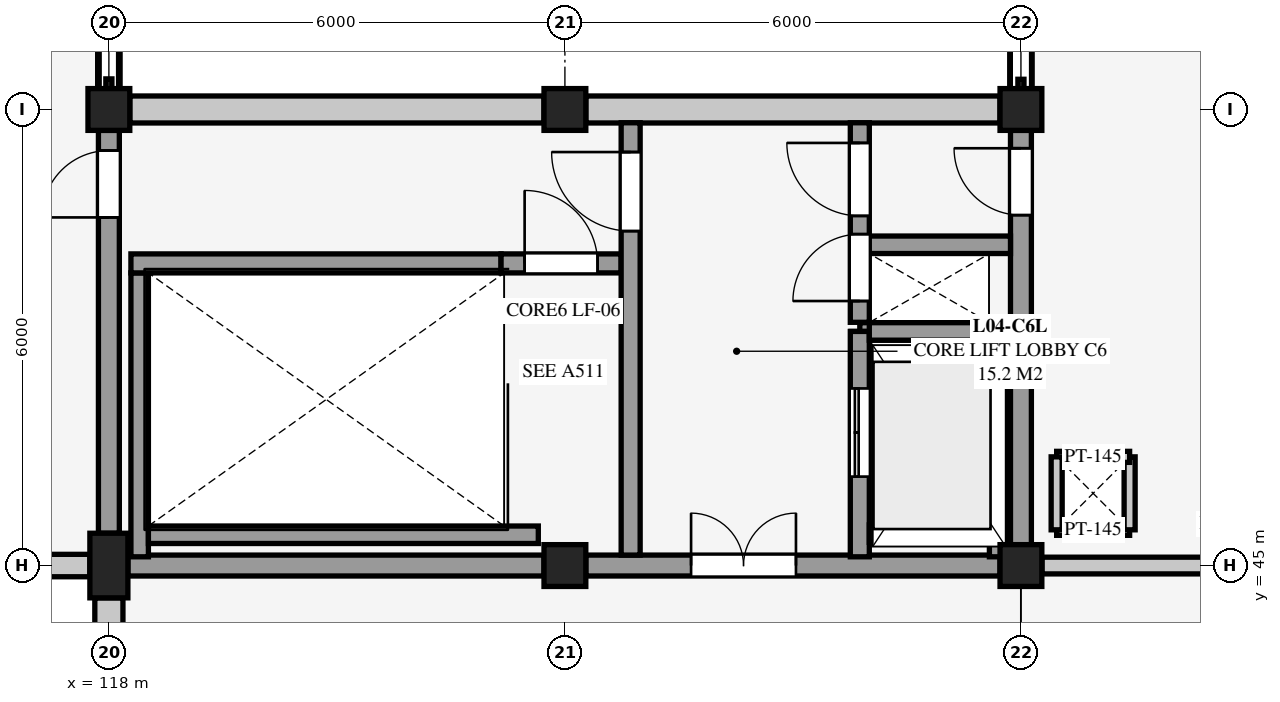
"""IFC4 building model, lengths in metres.
Left out: names, types, materials, properties, quantities, classifications, styles, units other than length and angle.
Written with IfcOpenShell. Run it as: python <this file> out.ifc"""

import sys

from ifc_helpers import new_model, si_unit, direction, frame, frame_2d, origin, origin_2d, place, context, subcontext, project, spatial, rectangle, extrude, element, fill, save


model = new_model("IFC4")
c1 = context("Model", 3, precision=1e-05, world=origin(), true_north=direction((0.0, 1.0)))
c2 = subcontext(c1, "Body", "Model", "MODEL_VIEW")
j1 = project(units=[si_unit("LENGTHUNIT", "METRE"), si_unit("PLANEANGLEUNIT", "RADIAN")], contexts=[c1])
p1 = place(None, origin())
s1 = spatial("IfcSite", under=j1, at=p1, CompositionType="ELEMENT")
p2 = place(p1, origin())
s2 = spatial("IfcBuilding", under=s1, at=p2, CompositionType="ELEMENT")
p3 = place(p2, frame((0.0, 0.0, 13.5)))
s3 = spatial("IfcBuildingStorey", under=s2, at=p3, CompositionType="ELEMENT", Elevation=13.5)
p4 = place(p3, frame((118.0, 45.0, 0.0), z_axis=(0.0, 0.0, 1.0), x_axis=(1.0, 0.0, 0.0)))
e1 = element("IfcColumn", 1, at=p4, inside=s3, PredefinedType="PILASTER", context=c2, shape_type="SweptSolid", body=[
    extrude(rectangle(XDim=0.5, YDim=0.85, at=origin_2d()), origin(), (0.0, 0.0, 1.0), 4.5),
])
for number, where, z_axis, x_axis in (
    (2, (118.0, 51.0, 0.0), (0.0, 0.0, 1.0), (1.0, 0.0, 0.0)),
    (3, (124.0, 45.0, 0.0), (0.0, 0.0, 1.0), (1.0, 0.0, 0.0)),
    (4, (124.0, 51.0, 0.0), (0.0, 0.0, 1.0), (1.0, 0.0, 0.0)),
    (5, (130.0, 45.0, 0.0), (0.0, 0.0, 1.0), (1.0, 0.0, 0.0)),
    (6, (130.0, 51.0, 0.0), (0.0, 0.0, 1.0), (1.0, 0.0, 0.0)),
):
    element("IfcColumn", number, at=place(p3, frame(where, z_axis=z_axis, x_axis=x_axis)), inside=s3, PredefinedType="COLUMN", context=c2, shape_type="SweptSolid", body=[
        extrude(rectangle(XDim=0.55, YDim=0.55, at=origin_2d()), origin(), (0.0, 0.0, 1.0), 4.5),
    ])
p5 = place(p3, frame((117.75, 45.0, 0.0), z_axis=(0.0, 0.0, 1.0), x_axis=(-1.0, 0.0, 0.0)))
e7 = element("IfcWall", 7, at=p5, inside=s3, PredefinedType="SOLIDWALL", context=c2, shape_type="SweptSolid", body=[
    extrude(rectangle(XDim=5.5, YDim=0.295, at=frame_2d((2.75, 0.0))), origin(), (0.0, 0.0, 1.0), 8.593),
])
p6 = place(p5, frame((1.95, 0.0, 1.25)))
e8 = element("IfcOpeningElement", 8, at=p6, cuts=e7, PredefinedType="OPENING", context=c2, shape_type="SweptSolid", body=[
    extrude(rectangle(XDim=1.6, YDim=1.5, at=frame_2d((0.8, 0.75))), frame((0.0, 0.157, 0.0), z_axis=(0.0, -1.0, 0.0), x_axis=(1.0, 0.0, 0.0)), (0.0, 0.0, 1.0), 0.315),
])
p7 = place(p3, frame((118.0, 56.075, 0.0), z_axis=(0.0, 0.0, 1.0), x_axis=(0.0, -1.0, 0.0)))
e9 = element("IfcWall", 9, at=p7, inside=s3, PredefinedType="SOLIDWALL", context=c2, shape_type="SweptSolid", body=[
    extrude(rectangle(XDim=4.8, YDim=0.295, at=frame_2d((2.4, 0.0))), origin(), (0.0, 0.0, 1.0), 0.26),
])
p8 = place(p3, frame((118.0, 39.275, 0.0), z_axis=(0.0, 0.0, 1.0), x_axis=(0.0, 1.0, 0.0)))
e10 = element("IfcWall", 10, at=p8, inside=s3, PredefinedType="SOLIDWALL", context=c2, shape_type="SweptSolid", body=[
    extrude(rectangle(XDim=5.3, YDim=0.37, at=frame_2d((2.65, 0.0))), origin(), (0.0, 0.0, 1.0), 4.093),
])
p9 = place(p8, frame((1.625, 0.0, 1.2)))
e11 = element("IfcOpeningElement", 11, at=p9, cuts=e10, PredefinedType="OPENING", context=c2, shape_type="SweptSolid", body=[
    extrude(rectangle(XDim=2.05, YDim=1.55, at=frame_2d((1.025, 0.775))), frame((0.0, 0.195, 0.0), z_axis=(0.0, -1.0, 0.0), x_axis=(1.0, 0.0, 0.0)), (0.0, 0.0, 1.0), 0.39),
])
for number, where, z_axis, x_axis in (
    (12, (118.275, 51.0, 0.0), (0.0, 0.0, 1.0), (1.0, 0.0, 0.0)),
    (13, (124.275, 51.0, 0.0), (0.0, 0.0, 1.0), (1.0, 0.0, 0.0)),
):
    element("IfcWall", number, at=place(p3, frame(where, z_axis=z_axis, x_axis=x_axis)), inside=s3, PredefinedType="SOLIDWALL", context=c2, shape_type="SweptSolid", body=[
        extrude(rectangle(XDim=5.45, YDim=0.355, at=frame_2d((2.725, 0.0))), origin(), (0.0, 0.0, 1.0), 4.093),
    ])
p10 = place(p3, frame((130.0, 51.275, 0.0), z_axis=(0.0, 0.0, 1.0), x_axis=(0.0, 1.0, 0.0)))
e14 = element("IfcWall", 14, at=p10, inside=s3, PredefinedType="SOLIDWALL", context=c2, shape_type="SweptSolid", body=[
    extrude(rectangle(XDim=4.95, YDim=0.295, at=frame_2d((2.475, 0.0))), origin(), (0.0, 0.0, 1.0), 0.46),
])
for number, where, z_axis, x_axis in (
    (15, (130.47, 45.47, 0.0), (0.0, 0.0, 1.0), (1.0, 0.0, 0.0)),
    (16, (131.43, 45.47, 0.0), (0.0, 0.0, 1.0), (0.0, 1.0, 0.0)),
    (17, (131.43, 46.43, 0.0), (0.0, 0.0, 1.0), (-1.0, 0.0, 0.0)),
    (18, (130.47, 46.43, 0.0), (0.0, 0.0, 1.0), (0.0, -1.0, 0.0)),
):
    element("IfcWall", number, at=place(p3, frame(where, z_axis=z_axis, x_axis=x_axis)), inside=s3, PredefinedType="PARTITIONING", context=c2, shape_type="SweptSolid", body=[
        extrude(rectangle(XDim=0.96, YDim=0.145, at=frame_2d((0.48, 0.0))), origin(), (0.0, 0.0, 1.0), 4.24),
    ])
p11 = place(p3, frame((127.88, 45.42, 4.5), z_axis=(0.0, 0.0, 1.0), x_axis=(1.0, 0.0, 0.0)))
e19 = element("IfcWall", 19, at=p11, inside=s3, PredefinedType="SHEAR", context=c2, shape_type="SweptSolid", body=[
    extrude(rectangle(XDim=1.82, YDim=0.23, at=frame_2d((0.91, 0.0))), origin(), (0.0, 0.0, 1.0), 1.0),
])
p12 = place(p3, frame((129.7, 45.42, 4.5), z_axis=(0.0, 0.0, 1.0), x_axis=(0.0, 1.0, 0.0)))
e20 = element("IfcWall", 20, at=p12, inside=s3, PredefinedType="SHEAR", context=c2, shape_type="SweptSolid", body=[
    extrude(rectangle(XDim=2.66, YDim=0.23, at=frame_2d((1.33, 0.0))), origin(), (0.0, 0.0, 1.0), 1.0),
])
p13 = place(p3, frame((129.7, 48.08, 4.5), z_axis=(0.0, 0.0, 1.0), x_axis=(-1.0, 0.0, 0.0)))
e21 = element("IfcWall", 21, at=p13, inside=s3, PredefinedType="SHEAR", context=c2, shape_type="SweptSolid", body=[
    extrude(rectangle(XDim=1.82, YDim=0.23, at=frame_2d((0.91, 0.0))), origin(), (0.0, 0.0, 1.0), 1.0),
])
p14 = place(p3, frame((127.88, 48.08, 4.5), z_axis=(0.0, 0.0, 1.0), x_axis=(0.0, -1.0, 0.0)))
e22 = element("IfcWall", 22, at=p14, inside=s3, PredefinedType="SHEAR", context=c2, shape_type="SweptSolid", body=[
    extrude(rectangle(XDim=2.66, YDim=0.23, at=frame_2d((1.33, 0.0))), origin(), (0.0, 0.0, 1.0), 1.0),
])
p15 = place(p3, frame((118.25, 45.0, 0.0), z_axis=(0.0, 0.0, 1.0), x_axis=(1.0, 0.0, 0.0)))
e23 = element("IfcWall", 23, at=p15, inside=s3, PredefinedType="SHEAR", context=c2, shape_type="SweptSolid", body=[
    extrude(rectangle(XDim=5.475, YDim=0.275, at=frame_2d((2.738, 0.0))), origin(), (0.0, 0.0, 1.0), 4.24),
])
p16 = place(p3, frame((124.275, 45.0, 0.0), z_axis=(0.0, 0.0, 1.0), x_axis=(1.0, 0.0, 0.0)))
e24 = element("IfcWall", 24, at=p16, inside=s3, PredefinedType="SHEAR", context=c2, shape_type="SweptSolid", body=[
    extrude(rectangle(XDim=5.45, YDim=0.275, at=frame_2d((2.725, 0.0))), origin(), (0.0, 0.0, 1.0), 4.24),
])
p17 = place(p16, frame((1.385, 0.0, 0.0)))
e25 = element("IfcOpeningElement", 25, at=p17, cuts=e24, PredefinedType="OPENING", context=c2, shape_type="SweptSolid", body=[
    extrude(rectangle(XDim=1.38, YDim=2.16, at=frame_2d((0.69, 1.08))), frame((0.0, 0.147, 0.0), z_axis=(0.0, -1.0, 0.0), x_axis=(1.0, 0.0, 0.0)), (0.0, 0.0, 1.0), 0.295),
])
p18 = place(p3, frame((118.0, 45.425, 0.0), z_axis=(0.0, 0.0, 1.0), x_axis=(0.0, 1.0, 0.0)))
e26 = element("IfcWall", 26, at=p18, inside=s3, PredefinedType="SHEAR", context=c2, shape_type="SweptSolid", body=[
    extrude(rectangle(XDim=5.3, YDim=0.275, at=frame_2d((2.65, 0.0))), origin(), (0.0, 0.0, 1.0), 4.24),
])
p19 = place(p18, frame((4.155, 0.0, 0.0)))
e27 = element("IfcOpeningElement", 27, at=p19, cuts=e26, PredefinedType="OPENING", context=c2, shape_type="SweptSolid", body=[
    extrude(rectangle(XDim=0.88, YDim=2.08, at=frame_2d((0.44, 1.04))), frame((0.0, 0.147, 0.0), z_axis=(0.0, -1.0, 0.0), x_axis=(1.0, 0.0, 0.0)), (0.0, 0.0, 1.0), 0.295),
])
p20 = place(p3, frame((130.0, 45.275, 0.0), z_axis=(0.0, 0.0, 1.0), x_axis=(0.0, 1.0, 0.0)))
e28 = element("IfcWall", 28, at=p20, inside=s3, PredefinedType="SHEAR", context=c2, shape_type="SweptSolid", body=[
    extrude(rectangle(XDim=5.45, YDim=0.275, at=frame_2d((2.725, 0.0))), origin(), (0.0, 0.0, 1.0), 4.24),
])
p21 = place(p20, frame((4.335, 0.0, 0.0)))
e29 = element("IfcOpeningElement", 29, at=p21, cuts=e28, PredefinedType="OPENING", context=c2, shape_type="SweptSolid", body=[
    extrude(rectangle(XDim=0.88, YDim=2.08, at=frame_2d((0.44, 1.04))), frame((0.0, 0.147, 0.0), z_axis=(0.0, -1.0, 0.0), x_axis=(1.0, 0.0, 0.0)), (0.0, 0.0, 1.0), 0.295),
])
p22 = place(p3, frame((118.405, 45.115, 0.0), z_axis=(0.0, 0.0, 1.0), x_axis=(0.0, 1.0, 0.0)))
e30 = element("IfcWall", 30, at=p22, inside=s3, PredefinedType="SHEAR", context=c2, shape_type="SweptSolid", body=[
    extrude(rectangle(XDim=3.735, YDim=0.23, at=frame_2d((1.868, 0.0))), origin(), (0.0, 0.0, 1.0), 4.5),
])
p23 = place(p3, frame((118.52, 45.405, 0.0), z_axis=(0.0, 0.0, 1.0), x_axis=(1.0, 0.0, 0.0)))
e31 = element("IfcWall", 31, at=p23, inside=s3, PredefinedType="SHEAR", context=c2, shape_type="SweptSolid", body=[
    extrude(rectangle(XDim=5.13, YDim=0.23, at=frame_2d((2.565, 0.0))), origin(), (0.0, 0.0, 1.0), 4.5),
])
p24 = place(p3, frame((118.29, 48.975, 0.0), z_axis=(0.0, 0.0, 1.0), x_axis=(1.0, 0.0, 0.0)))
e32 = element("IfcWall", 32, at=p24, inside=s3, PredefinedType="SHEAR", context=c2, shape_type="SweptSolid", body=[
    extrude(rectangle(XDim=4.87, YDim=0.25, at=frame_2d((2.435, 0.0))), origin(), (0.0, 0.0, 1.0), 4.5),
])
p25 = place(p3, frame((123.16, 48.975, 0.0), z_axis=(0.0, 0.0, 1.0), x_axis=(1.0, 0.0, 0.0)))
e33 = element("IfcWall", 33, at=p25, inside=s3, PredefinedType="SHEAR", context=c2, shape_type="SweptSolid", body=[
    extrude(rectangle(XDim=1.58, YDim=0.25, at=frame_2d((0.79, 0.0))), origin(), (0.0, 0.0, 1.0), 4.24),
])
p26 = place(p25, frame((0.31, 0.0, 0.0)))
e34 = element("IfcOpeningElement", 34, at=p26, cuts=e33, PredefinedType="OPENING", context=c2, shape_type="SweptSolid", body=[
    extrude(rectangle(XDim=0.96, YDim=2.12, at=frame_2d((0.48, 1.06))), frame((0.0, 0.135, 0.0), z_axis=(0.0, -1.0, 0.0), x_axis=(1.0, 0.0, 0.0)), (0.0, 0.0, 1.0), 0.27),
])
p27 = place(p3, frame((124.865, 45.137, 0.0), z_axis=(0.0, 0.0, 1.0), x_axis=(0.0, 1.0, 0.0)))
e35 = element("IfcWall", 35, at=p27, inside=s3, PredefinedType="SHEAR", context=c2, shape_type="SweptSolid", body=[
    extrude(rectangle(XDim=5.688, YDim=0.25, at=frame_2d((2.844, 0.0))), origin(), (0.0, 0.0, 1.0), 4.24),
])
p28 = place(p27, frame((4.262, 0.0, 0.0)))
e36 = element("IfcOpeningElement", 36, at=p28, cuts=e35, PredefinedType="OPENING", context=c2, shape_type="SweptSolid", body=[
    extrude(rectangle(XDim=1.04, YDim=2.14, at=frame_2d((0.52, 1.07))), frame((0.0, 0.135, 0.0), z_axis=(0.0, -1.0, 0.0), x_axis=(1.0, 0.0, 0.0)), (0.0, 0.0, 1.0), 0.27),
])
p29 = place(p3, frame((127.88, 45.115, 0.0), z_axis=(0.0, 0.0, 1.0), x_axis=(0.0, 1.0, 0.0)))
e37 = element("IfcWall", 37, at=p29, inside=s3, PredefinedType="SHEAR", context=c2, shape_type="SweptSolid", body=[
    extrude(rectangle(XDim=2.965, YDim=0.25, at=frame_2d((1.482, 0.0))), origin(), (0.0, 0.0, 1.0), 4.5),
])
p30 = place(p29, frame((1.055, 0.0, 0.0)))
e38 = element("IfcOpeningElement", 38, at=p30, cuts=e37, PredefinedType="OPENING", context=c2, shape_type="SweptSolid", body=[
    extrude(rectangle(XDim=1.16, YDim=2.18, at=frame_2d((0.58, 1.09))), frame((0.0, 0.135, 0.0), z_axis=(0.0, -1.0, 0.0), x_axis=(1.0, 0.0, 0.0)), (0.0, 0.0, 1.0), 0.27),
])
p31 = place(p3, frame((128.005, 45.42, 0.0), z_axis=(0.0, 0.0, 1.0), x_axis=(1.0, 0.0, 0.0)))
e39 = element("IfcWall", 39, at=p31, inside=s3, PredefinedType="SHEAR", context=c2, shape_type="SweptSolid", body=[
    extrude(rectangle(XDim=1.58, YDim=0.23, at=frame_2d((0.79, 0.0))), origin(), (0.0, 0.0, 1.0), 4.5),
])
p32 = place(p3, frame((129.7, 45.115, 0.0), z_axis=(0.0, 0.0, 1.0), x_axis=(0.0, 1.0, 0.0)))
e40 = element("IfcWall", 40, at=p32, inside=s3, PredefinedType="SHEAR", context=c2, shape_type="SweptSolid", body=[
    extrude(rectangle(XDim=2.965, YDim=0.23, at=frame_2d((1.482, 0.0))), origin(), (0.0, 0.0, 1.0), 4.5),
])
p33 = place(p3, frame((128.005, 48.08, 0.0), z_axis=(0.0, 0.0, 1.0), x_axis=(1.0, 0.0, 0.0)))
e41 = element("IfcWall", 41, at=p33, inside=s3, PredefinedType="SHEAR", context=c2, shape_type="SweptSolid", body=[
    extrude(rectangle(XDim=1.58, YDim=0.23, at=frame_2d((0.79, 0.0))), origin(), (0.0, 0.0, 1.0), 4.5),
])
p34 = place(p3, frame((127.88, 48.2, 0.0), z_axis=(0.0, 0.0, 1.0), x_axis=(0.0, 1.0, 0.0)))
e42 = element("IfcWall", 42, at=p34, inside=s3, PredefinedType="SHEAR", context=c2, shape_type="SweptSolid", body=[
    extrude(rectangle(XDim=2.625, YDim=0.25, at=frame_2d((1.312, 0.0))), origin(), (0.0, 0.0, 1.0), 4.24),
])
p35 = place(p34, frame((0.28, 0.0, 0.0)))
e43 = element("IfcOpeningElement", 43, at=p35, cuts=e42, PredefinedType="OPENING", context=c2, shape_type="SweptSolid", body=[
    extrude(rectangle(XDim=0.88, YDim=2.08, at=frame_2d((0.44, 1.04))), frame((0.0, 0.135, 0.0), z_axis=(0.0, -1.0, 0.0), x_axis=(1.0, 0.0, 0.0)), (0.0, 0.0, 1.0), 0.27),
])
p36 = place(p34, frame((1.4, 0.0, 0.0)))
e44 = element("IfcOpeningElement", 44, at=p36, cuts=e42, PredefinedType="OPENING", context=c2, shape_type="SweptSolid", body=[
    extrude(rectangle(XDim=0.96, YDim=2.12, at=frame_2d((0.48, 1.06))), frame((0.0, 0.135, 0.0), z_axis=(0.0, -1.0, 0.0), x_axis=(1.0, 0.0, 0.0)), (0.0, 0.0, 1.0), 0.27),
])
p37 = place(p3, frame((128.005, 49.22, 0.0), z_axis=(0.0, 0.0, 1.0), x_axis=(1.0, 0.0, 0.0)))
e45 = element("IfcWall", 45, at=p37, inside=s3, PredefinedType="SHEAR", context=c2, shape_type="SweptSolid", body=[
    extrude(rectangle(XDim=1.858, YDim=0.23, at=frame_2d((0.929, 0.0))), origin(), (0.0, 0.0, 1.0), 4.24),
])
p38 = place(p3, frame((130.277, 45.0, 0.0), z_axis=(0.0, 0.0, 1.0), x_axis=(1.0, 0.0, 0.0)))
e46 = element("IfcWall", 46, at=p38, inside=s3, PredefinedType="SOLIDWALL", context=c2, shape_type="SweptSolid", body=[
    extrude(rectangle(XDim=5.446, YDim=0.22, at=frame_2d((2.723, 0.0))), origin(), (0.0, 0.0, 1.0), 4.146),
])
p39 = place(p38, frame((2.253, 0.0, 0.0)))
e47 = element("IfcOpeningElement", 47, at=p39, cuts=e46, PredefinedType="OPENING", context=c2, shape_type="SweptSolid", body=[
    extrude(rectangle(XDim=0.94, YDim=2.1, at=frame_2d((0.47, 1.05))), frame((0.0, 0.12, 0.0), z_axis=(0.0, -1.0, 0.0), x_axis=(1.0, 0.0, 0.0)), (0.0, 0.0, 1.0), 0.24),
])
p40 = place(p17, origin())
e48 = element("IfcDoor", 48, at=p40, inside=s3, OperationType="DOUBLE_DOOR_SINGLE_SWING", PredefinedType="DOOR", context=c2, shape_type="SweptSolid", body=[
    extrude(rectangle(XDim=1.38, YDim=2.16, at=frame_2d((0.69, 1.08))), frame((0.0, 0.025, 0.0), z_axis=(0.0, -1.0, 0.0), x_axis=(1.0, 0.0, 0.0)), (0.0, 0.0, 1.0), 0.05),
])
fill(e25, e48)
p41 = place(p19, origin())
e49 = element("IfcDoor", 49, at=p41, inside=s3, OperationType="SINGLE_SWING_LEFT", PredefinedType="DOOR", context=c2, shape_type="SweptSolid", body=[
    extrude(rectangle(XDim=0.88, YDim=2.08, at=frame_2d((0.44, 1.04))), frame((0.0, 0.025, 0.0), z_axis=(0.0, -1.0, 0.0), x_axis=(1.0, 0.0, 0.0)), (0.0, 0.0, 1.0), 0.05),
])
fill(e27, e49)
p42 = place(p21, origin())
e50 = element("IfcDoor", 50, at=p42, inside=s3, OperationType="SINGLE_SWING_RIGHT", PredefinedType="DOOR", context=c2, shape_type="SweptSolid", body=[
    extrude(rectangle(XDim=0.88, YDim=2.08, at=frame_2d((0.44, 1.04))), frame((0.0, 0.025, 0.0), z_axis=(0.0, -1.0, 0.0), x_axis=(1.0, 0.0, 0.0)), (0.0, 0.0, 1.0), 0.05),
])
fill(e29, e50)
p43 = place(p26, origin())
e51 = element("IfcDoor", 51, at=p43, inside=s3, OperationType="SINGLE_SWING_LEFT", PredefinedType="DOOR", context=c2, shape_type="SweptSolid", body=[
    extrude(rectangle(XDim=0.96, YDim=2.12, at=frame_2d((0.48, 1.06))), frame((0.0, 0.025, 0.0), z_axis=(0.0, -1.0, 0.0), x_axis=(1.0, 0.0, 0.0)), (0.0, 0.0, 1.0), 0.05),
])
fill(e34, e51)
p44 = place(p28, origin())
e52 = element("IfcDoor", 52, at=p44, inside=s3, OperationType="SINGLE_SWING_RIGHT", PredefinedType="DOOR", context=c2, shape_type="SweptSolid", body=[
    extrude(rectangle(XDim=1.04, YDim=2.14, at=frame_2d((0.52, 1.07))), frame((0.0, 0.025, 0.0), z_axis=(0.0, -1.0, 0.0), x_axis=(1.0, 0.0, 0.0)), (0.0, 0.0, 1.0), 0.05),
])
fill(e36, e52)
p45 = place(p30, origin())
e53 = element("IfcDoor", 53, at=p45, inside=s3, OperationType="DOUBLE_DOOR_SLIDING", PredefinedType="DOOR", context=c2, shape_type="SweptSolid", body=[
    extrude(rectangle(XDim=1.16, YDim=2.18, at=frame_2d((0.58, 1.09))), frame((0.0, 0.025, 0.0), z_axis=(0.0, -1.0, 0.0), x_axis=(1.0, 0.0, 0.0)), (0.0, 0.0, 1.0), 0.05),
])
fill(e38, e53)
p46 = place(p35, origin())
e54 = element("IfcDoor", 54, at=p46, inside=s3, OperationType="SINGLE_SWING_LEFT", PredefinedType="DOOR", context=c2, shape_type="SweptSolid", body=[
    extrude(rectangle(XDim=0.88, YDim=2.08, at=frame_2d((0.44, 1.04))), frame((0.0, 0.025, 0.0), z_axis=(0.0, -1.0, 0.0), x_axis=(1.0, 0.0, 0.0)), (0.0, 0.0, 1.0), 0.05),
])
fill(e43, e54)
p47 = place(p36, origin())
e55 = element("IfcDoor", 55, at=p47, inside=s3, OperationType="SINGLE_SWING_RIGHT", PredefinedType="DOOR", context=c2, shape_type="SweptSolid", body=[
    extrude(rectangle(XDim=0.96, YDim=2.12, at=frame_2d((0.48, 1.06))), frame((0.0, 0.025, 0.0), z_axis=(0.0, -1.0, 0.0), x_axis=(1.0, 0.0, 0.0)), (0.0, 0.0, 1.0), 0.05),
])
fill(e44, e55)
save(model, sys.argv[1])
